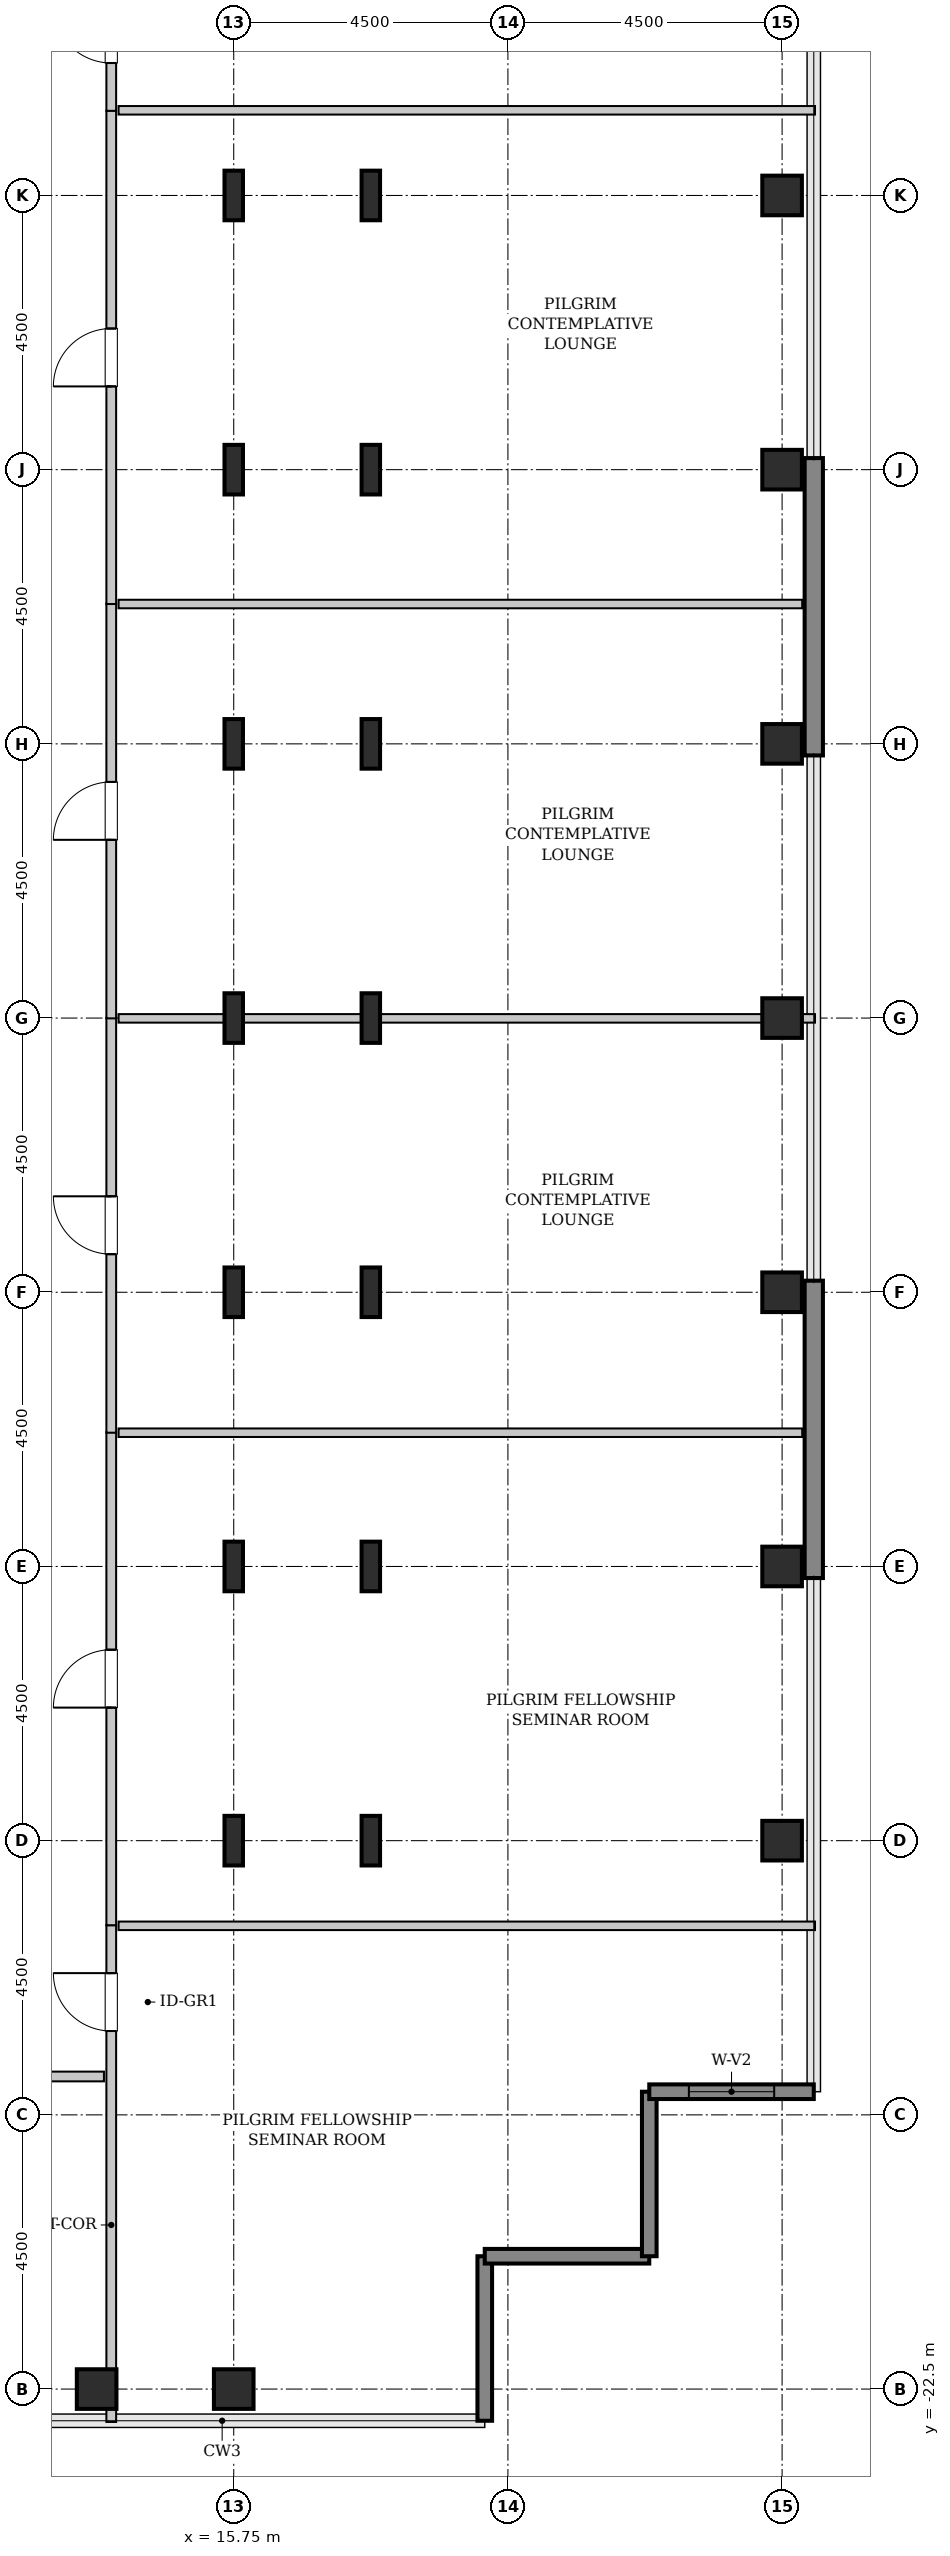
"""IFC4 building model, lengths in metres.
Left out: names, types, materials, properties, quantities, classifications, styles, units other than length and angle.
Written with IfcOpenShell. Run it as: python <this file> out.ifc"""

import sys

from ifc_helpers import new_model, si_unit, direction, frame, frame_2d, origin, origin_2d, place, context, subcontext, project, spatial, rectangle, hollow_rectangle, i_section, extrude, source, transform, mapped, element, fill, save


model = new_model("IFC4")
c1 = context("Model", 3, precision=1e-05, world=origin(), true_north=direction((0.0, 1.0)))
c2 = subcontext(c1, "Body", "Model", "MODEL_VIEW")
j1 = project(units=[si_unit("LENGTHUNIT", "METRE"), si_unit("PLANEANGLEUNIT", "RADIAN")], contexts=[c1])
p1 = place(None, origin())
s1 = spatial("IfcSite", under=j1, at=p1, CompositionType="ELEMENT")
p2 = place(p1, origin())
s2 = spatial("IfcBuilding", under=s1, at=p2, CompositionType="ELEMENT")
p3 = place(p2, frame((0.0, 0.0, 206.6)))
s3 = spatial("IfcBuildingStorey", under=s2, at=p3, CompositionType="ELEMENT", Elevation=206.6)
m1 = source(origin(), c2, "Body", "SweptSolid", [
    extrude(hollow_rectangle(XDim=0.65, YDim=0.65, WallThickness=0.032, InnerFilletRadius=0.032, OuterFilletRadius=0.064, at=origin_2d()), origin(), (0.0, 0.0, 1.0), 3.8),
])
for number, where, z_axis, x_axis in (
    (1, (13.5, -22.5, 0.0), (0.0, 0.0, 1.0), (1.0, 0.0, 0.0)),
    (2, (15.75, -22.5, 0.0), (0.0, 0.0, 1.0), (1.0, 0.0, 0.0)),
):
    element("IfcColumn", number, at=place(p3, frame(where, z_axis=z_axis, x_axis=x_axis)), inside=s3, PredefinedType="COLUMN", context=c2, shape_type="MappedRepresentation", body=[
        mapped(m1, transform((0.0, 0.0, 0.0), x_axis=(1.0, 0.0, 0.0), y_axis=(0.0, 1.0, 0.0), z_axis=(0.0, 0.0, 1.0), scale=1.0)),
    ])
m2 = source(origin(), c2, "Body", "SweptSolid", [
    extrude(i_section(OverallWidth=0.303, OverallDepth=0.814, WebThickness=0.021, FlangeThickness=0.04, FilletRadius=0.03, at=origin_2d()), origin(), (0.0, 0.0, 1.0), 3.8),
])
for number, where, z_axis, x_axis in (
    (3, (15.75, -13.5, 0.0), (0.0, 0.0, 1.0), (1.0, 0.0, 0.0)),
    (4, (15.75, -9.0, 0.0), (0.0, 0.0, 1.0), (1.0, 0.0, 0.0)),
    (5, (15.75, -4.5, 0.0), (0.0, 0.0, 1.0), (1.0, 0.0, 0.0)),
    (6, (15.75, 0.0, 0.0), (0.0, 0.0, 1.0), (1.0, 0.0, 0.0)),
    (7, (15.75, 4.5, 0.0), (0.0, 0.0, 1.0), (1.0, 0.0, 0.0)),
    (8, (15.75, 9.0, 0.0), (0.0, 0.0, 1.0), (1.0, 0.0, 0.0)),
    (9, (15.75, 13.5, 0.0), (0.0, 0.0, 1.0), (1.0, 0.0, 0.0)),
    (10, (18.0, -13.5, 0.0), (0.0, 0.0, 1.0), (1.0, 0.0, 0.0)),
    (11, (18.0, -9.0, 0.0), (0.0, 0.0, 1.0), (1.0, 0.0, 0.0)),
    (12, (18.0, -4.5, 0.0), (0.0, 0.0, 1.0), (1.0, 0.0, 0.0)),
    (13, (18.0, 0.0, 0.0), (0.0, 0.0, 1.0), (1.0, 0.0, 0.0)),
    (14, (18.0, 4.5, 0.0), (0.0, 0.0, 1.0), (1.0, 0.0, 0.0)),
    (15, (18.0, 9.0, 0.0), (0.0, 0.0, 1.0), (1.0, 0.0, 0.0)),
    (16, (18.0, 13.5, 0.0), (0.0, 0.0, 1.0), (1.0, 0.0, 0.0)),
):
    element("IfcColumn", number, at=place(p3, frame(where, z_axis=z_axis, x_axis=x_axis)), inside=s3, PredefinedType="COLUMN", context=c2, shape_type="MappedRepresentation", body=[
        mapped(m2, transform((0.0, 0.0, 0.0), x_axis=(1.0, 0.0, 0.0), y_axis=(0.0, 1.0, 0.0), z_axis=(0.0, 0.0, 1.0), scale=1.0)),
    ])
for number, where, z_axis, x_axis in (
    (17, (24.75, -13.5, 0.0), (0.0, 0.0, 1.0), (1.0, 0.0, 0.0)),
    (18, (24.75, -9.0, 0.0), (0.0, 0.0, 1.0), (1.0, 0.0, 0.0)),
    (19, (24.75, -4.5, 0.0), (0.0, 0.0, 1.0), (1.0, 0.0, 0.0)),
    (20, (24.75, 0.0, 0.0), (0.0, 0.0, 1.0), (1.0, 0.0, 0.0)),
    (21, (24.75, 4.5, 0.0), (0.0, 0.0, 1.0), (1.0, 0.0, 0.0)),
    (22, (24.75, 9.0, 0.0), (0.0, 0.0, 1.0), (1.0, 0.0, 0.0)),
    (23, (24.75, 13.5, 0.0), (0.0, 0.0, 1.0), (1.0, 0.0, 0.0)),
):
    element("IfcColumn", number, at=place(p3, frame(where, z_axis=z_axis, x_axis=x_axis)), inside=s3, PredefinedType="COLUMN", context=c2, shape_type="MappedRepresentation", body=[
        mapped(m1, transform((0.0, 0.0, 0.0), x_axis=(1.0, 0.0, 0.0), y_axis=(0.0, 1.0, 0.0), z_axis=(0.0, 0.0, 1.0), scale=1.0)),
    ])
m3 = source(origin(), c2, "Body", "SweptSolid", [
    extrude(rectangle(XDim=4.88, YDim=0.3, at=frame_2d((2.44, 0.0))), origin(), (0.0, 0.0, 1.0), 3.55),
])
for number, where, z_axis, x_axis in (
    (24, (25.27, -9.19, 0.0), (0.0, 0.0, 1.0), (0.0, 1.0, 0.0)),
    (25, (25.27, 4.31, 0.0), (0.0, 0.0, 1.0), (0.0, 1.0, 0.0)),
):
    element("IfcWall", number, at=place(p3, frame(where, z_axis=z_axis, x_axis=x_axis)), inside=s3, PredefinedType="SHEAR", context=c2, shape_type="MappedRepresentation", body=[
        mapped(m3, transform((0.0, 0.0, 0.0), x_axis=(1.0, 0.0, 0.0), y_axis=(0.0, 1.0, 0.0), z_axis=(0.0, 0.0, 1.0), scale=1.0)),
    ])
m4 = source(origin(), c2, "Body", "SweptSolid", [
    extrude(rectangle(XDim=2.7, YDim=0.24, at=frame_2d((1.35, 0.0))), origin(), (0.0, 0.0, 1.0), 3.55),
])
for number, where, z_axis, x_axis in (
    (26, (19.87, -23.02, 0.0), (0.0, 0.0, 1.0), (0.0, 1.0, 0.0)),
    (27, (19.87, -20.32, 0.0), (0.0, 0.0, 1.0), (1.0, 0.0, 0.0)),
    (28, (22.57, -20.32, 0.0), (0.0, 0.0, 1.0), (0.0, 1.0, 0.0)),
):
    element("IfcWall", number, at=place(p3, frame(where, z_axis=z_axis, x_axis=x_axis)), inside=s3, PredefinedType="SHEAR", context=c2, shape_type="MappedRepresentation", body=[
        mapped(m4, transform((0.0, 0.0, 0.0), x_axis=(1.0, 0.0, 0.0), y_axis=(0.0, 1.0, 0.0), z_axis=(0.0, 0.0, 1.0), scale=1.0)),
    ])
p4 = place(p3, frame((22.57, -17.62, 0.0), z_axis=(0.0, 0.0, 1.0), x_axis=(1.0, 0.0, 0.0)))
e29 = element("IfcWall", 29, at=p4, inside=s3, PredefinedType="SHEAR", context=c2, shape_type="MappedRepresentation", body=[
    mapped(m4, transform((0.0, 0.0, 0.0), x_axis=(1.0, 0.0, 0.0), y_axis=(0.0, 1.0, 0.0), z_axis=(0.0, 0.0, 1.0), scale=1.0)),
])
p5 = place(p4, frame((0.65, 0.0, 0.85)))
e30 = element("IfcOpeningElement", 30, at=p5, cuts=e29, PredefinedType="OPENING", context=c2, shape_type="SweptSolid", body=[
    extrude(rectangle(XDim=1.4, YDim=1.8, at=frame_2d((0.7, 0.9))), frame((0.0, 0.13, 0.0), z_axis=(0.0, -1.0, 0.0), x_axis=(1.0, 0.0, 0.0)), (0.0, 0.0, 1.0), 0.26),
])
m5 = source(origin(), c2, "Body", "SweptSolid", [
    extrude(rectangle(XDim=8.153, YDim=0.16, at=frame_2d((4.076, 0.0))), origin(), (0.0, 0.0, 1.0), 3.535),
])
p6 = place(p3, frame((13.74, -23.04, 0.0), z_axis=(0.0, 0.0, 1.0), x_axis=(0.0, 1.0, 0.0)))
e31 = element("IfcWall", 31, at=p6, inside=s3, PredefinedType="PARTITIONING", context=c2, shape_type="MappedRepresentation", body=[
    mapped(m5, transform((0.0, 0.0, 0.0), x_axis=(1.0, 0.0, 0.0), y_axis=(0.0, 1.0, 0.0), z_axis=(0.0, 0.0, 1.0), scale=1.0)),
])
p7 = place(p6, frame((6.416, 0.0, 0.0)))
e32 = element("IfcOpeningElement", 32, at=p7, cuts=e31, PredefinedType="OPENING", context=c2, shape_type="SweptSolid", body=[
    extrude(rectangle(XDim=0.95, YDim=2.1, at=frame_2d((0.475, 1.05))), frame((0.0, 0.09, 0.0), z_axis=(0.0, -1.0, 0.0), x_axis=(1.0, 0.0, 0.0)), (0.0, 0.0, 1.0), 0.18),
])
m6 = source(origin(), c2, "Body", "SweptSolid", [
    extrude(rectangle(XDim=11.43, YDim=0.14, at=frame_2d((5.715, 0.0))), origin(), (0.0, 0.0, 1.0), 3.535),
])
p8 = place(p3, frame((13.86, -14.897, 0.0), z_axis=(0.0, 0.0, 1.0), x_axis=(1.0, 0.0, 0.0)))
e33 = element("IfcWall", 33, at=p8, inside=s3, PredefinedType="PARTITIONING", context=c2, shape_type="MappedRepresentation", body=[
    mapped(m6, transform((0.0, 0.0, 0.0), x_axis=(1.0, 0.0, 0.0), y_axis=(0.0, 1.0, 0.0), z_axis=(0.0, 0.0, 1.0), scale=1.0)),
])
m7 = source(origin(), c2, "Body", "SweptSolid", [
    extrude(rectangle(XDim=8.093, YDim=0.16, at=frame_2d((4.046, 0.0))), origin(), (0.0, 0.0, 1.0), 3.535),
])
p9 = place(p3, frame((13.74, -14.887, 0.0), z_axis=(0.0, 0.0, 1.0), x_axis=(0.0, 1.0, 0.0)))
e34 = element("IfcWall", 34, at=p9, inside=s3, PredefinedType="PARTITIONING", context=c2, shape_type="MappedRepresentation", body=[
    mapped(m7, transform((0.0, 0.0, 0.0), x_axis=(1.0, 0.0, 0.0), y_axis=(0.0, 1.0, 0.0), z_axis=(0.0, 0.0, 1.0), scale=1.0)),
])
p10 = place(p9, frame((3.571, 0.0, 0.0)))
e35 = element("IfcOpeningElement", 35, at=p10, cuts=e34, PredefinedType="OPENING", context=c2, shape_type="SweptSolid", body=[
    extrude(rectangle(XDim=0.95, YDim=2.1, at=frame_2d((0.475, 1.05))), frame((0.0, 0.09, 0.0), z_axis=(0.0, -1.0, 0.0), x_axis=(1.0, 0.0, 0.0)), (0.0, 0.0, 1.0), 0.18),
])
m8 = source(origin(), c2, "Body", "SweptSolid", [
    extrude(rectangle(XDim=11.22, YDim=0.14, at=frame_2d((5.61, 0.0))), origin(), (0.0, 0.0, 1.0), 3.535),
])
p11 = place(p3, frame((13.86, -6.805, 0.0), z_axis=(0.0, 0.0, 1.0), x_axis=(1.0, 0.0, 0.0)))
e36 = element("IfcWall", 36, at=p11, inside=s3, PredefinedType="PARTITIONING", context=c2, shape_type="MappedRepresentation", body=[
    mapped(m8, transform((0.0, 0.0, 0.0), x_axis=(1.0, 0.0, 0.0), y_axis=(0.0, 1.0, 0.0), z_axis=(0.0, 0.0, 1.0), scale=1.0)),
])
m9 = source(origin(), c2, "Body", "SweptSolid", [
    extrude(rectangle(XDim=6.81, YDim=0.16, at=frame_2d((3.405, 0.0))), origin(), (0.0, 0.0, 1.0), 3.535),
])
p12 = place(p3, frame((13.74, -6.805, 0.0), z_axis=(0.0, 0.0, 1.0), x_axis=(0.0, 1.0, 0.0)))
e37 = element("IfcWall", 37, at=p12, inside=s3, PredefinedType="PARTITIONING", context=c2, shape_type="MappedRepresentation", body=[
    mapped(m9, transform((0.0, 0.0, 0.0), x_axis=(1.0, 0.0, 0.0), y_axis=(0.0, 1.0, 0.0), z_axis=(0.0, 0.0, 1.0), scale=1.0)),
])
p13 = place(p12, frame((2.93, 0.0, 0.0)))
e38 = element("IfcOpeningElement", 38, at=p13, cuts=e37, PredefinedType="OPENING", context=c2, shape_type="SweptSolid", body=[
    extrude(rectangle(XDim=0.95, YDim=2.1, at=frame_2d((0.475, 1.05))), frame((0.0, 0.09, 0.0), z_axis=(0.0, -1.0, 0.0), x_axis=(1.0, 0.0, 0.0)), (0.0, 0.0, 1.0), 0.18),
])
m10 = source(origin(), c2, "Body", "SweptSolid", [
    extrude(rectangle(XDim=11.43, YDim=0.14, at=frame_2d((5.715, 0.0))), origin(), (0.0, 0.0, 1.0), 2.925),
])
p14 = place(p3, frame((13.86, -0.005, 0.0), z_axis=(0.0, 0.0, 1.0), x_axis=(1.0, 0.0, 0.0)))
e39 = element("IfcWall", 39, at=p14, inside=s3, PredefinedType="PARTITIONING", context=c2, shape_type="MappedRepresentation", body=[
    mapped(m10, transform((0.0, 0.0, 0.0), x_axis=(1.0, 0.0, 0.0), y_axis=(0.0, 1.0, 0.0), z_axis=(0.0, 0.0, 1.0), scale=1.0)),
])
p15 = place(p3, frame((13.74, -0.005, 0.0), z_axis=(0.0, 0.0, 1.0), x_axis=(0.0, 1.0, 0.0)))
e40 = element("IfcWall", 40, at=p15, inside=s3, PredefinedType="PARTITIONING", context=c2, shape_type="MappedRepresentation", body=[
    mapped(m9, transform((0.0, 0.0, 0.0), x_axis=(1.0, 0.0, 0.0), y_axis=(0.0, 1.0, 0.0), z_axis=(0.0, 0.0, 1.0), scale=1.0)),
])
p16 = place(p15, frame((2.93, 0.0, 0.0)))
e41 = element("IfcOpeningElement", 41, at=p16, cuts=e40, PredefinedType="OPENING", context=c2, shape_type="SweptSolid", body=[
    extrude(rectangle(XDim=0.95, YDim=2.1, at=frame_2d((0.475, 1.05))), frame((0.0, 0.09, 0.0), z_axis=(0.0, -1.0, 0.0), x_axis=(1.0, 0.0, 0.0)), (0.0, 0.0, 1.0), 0.18),
])
p17 = place(p3, frame((13.86, 6.795, 0.0), z_axis=(0.0, 0.0, 1.0), x_axis=(1.0, 0.0, 0.0)))
e42 = element("IfcWall", 42, at=p17, inside=s3, PredefinedType="PARTITIONING", context=c2, shape_type="MappedRepresentation", body=[
    mapped(m8, transform((0.0, 0.0, 0.0), x_axis=(1.0, 0.0, 0.0), y_axis=(0.0, 1.0, 0.0), z_axis=(0.0, 0.0, 1.0), scale=1.0)),
])
p18 = place(p3, frame((13.74, 14.887, 0.0), z_axis=(0.0, 0.0, 1.0), x_axis=(0.0, 1.0, 0.0)))
e43 = element("IfcWall", 43, at=p18, inside=s3, PredefinedType="PARTITIONING", context=c2, shape_type="MappedRepresentation", body=[
    mapped(m5, transform((0.0, 0.0, 0.0), x_axis=(1.0, 0.0, 0.0), y_axis=(0.0, 1.0, 0.0), z_axis=(0.0, 0.0, 1.0), scale=1.0)),
])
p19 = place(p18, frame((0.786, 0.0, 0.0)))
e44 = element("IfcOpeningElement", 44, at=p19, cuts=e43, PredefinedType="OPENING", context=c2, shape_type="SweptSolid", body=[
    extrude(rectangle(XDim=0.95, YDim=2.1, at=frame_2d((0.475, 1.05))), frame((0.0, 0.09, 0.0), z_axis=(0.0, -1.0, 0.0), x_axis=(1.0, 0.0, 0.0)), (0.0, 0.0, 1.0), 0.18),
])
p20 = place(p3, frame((13.86, 14.897, 0.0), z_axis=(0.0, 0.0, 1.0), x_axis=(1.0, 0.0, 0.0)))
e45 = element("IfcWall", 45, at=p20, inside=s3, PredefinedType="PARTITIONING", context=c2, shape_type="MappedRepresentation", body=[
    mapped(m6, transform((0.0, 0.0, 0.0), x_axis=(1.0, 0.0, 0.0), y_axis=(0.0, 1.0, 0.0), z_axis=(0.0, 0.0, 1.0), scale=1.0)),
])
p21 = place(p3, frame((13.74, 6.795, 0.0), z_axis=(0.0, 0.0, 1.0), x_axis=(0.0, 1.0, 0.0)))
e46 = element("IfcWall", 46, at=p21, inside=s3, PredefinedType="PARTITIONING", context=c2, shape_type="MappedRepresentation", body=[
    mapped(m7, transform((0.0, 0.0, 0.0), x_axis=(1.0, 0.0, 0.0), y_axis=(0.0, 1.0, 0.0), z_axis=(0.0, 0.0, 1.0), scale=1.0)),
])
p22 = place(p21, frame((3.571, 0.0, 0.0)))
e47 = element("IfcOpeningElement", 47, at=p22, cuts=e46, PredefinedType="OPENING", context=c2, shape_type="SweptSolid", body=[
    extrude(rectangle(XDim=0.95, YDim=2.1, at=frame_2d((0.475, 1.05))), frame((0.0, 0.09, 0.0), z_axis=(0.0, -1.0, 0.0), x_axis=(1.0, 0.0, 0.0)), (0.0, 0.0, 1.0), 0.18),
])
m11 = source(origin(), c2, "Body", "SweptSolid", [
    extrude(rectangle(XDim=6.225, YDim=0.16, at=frame_2d((3.113, 0.0))), origin(), (0.0, 0.0, 1.0), 3.535),
])
p23 = place(p3, frame((7.395, -17.37, 0.0), z_axis=(0.0, 0.0, 1.0), x_axis=(1.0, 0.0, 0.0)))
e48 = element("IfcWall", 48, at=p23, inside=s3, PredefinedType="PARTITIONING", context=c2, shape_type="MappedRepresentation", body=[
    mapped(m11, transform((0.0, 0.0, 0.0), x_axis=(1.0, 0.0, 0.0), y_axis=(0.0, 1.0, 0.0), z_axis=(0.0, 0.0, 1.0), scale=1.0)),
])
p24 = place(p23, frame((2.26, 0.0, 0.0)))
e49 = element("IfcOpeningElement", 49, at=p24, cuts=e48, PredefinedType="OPENING", context=c2, shape_type="SweptSolid", body=[
    extrude(rectangle(XDim=0.95, YDim=2.1, at=frame_2d((0.475, 1.05))), frame((0.0, 0.09, 0.0), z_axis=(0.0, -1.0, 0.0), x_axis=(1.0, 0.0, 0.0)), (0.0, 0.0, 1.0), 0.18),
])
m12 = source(origin(), c2, "Body", "SweptSolid", [
    extrude(rectangle(XDim=1.4, YDim=1.8, at=frame_2d((0.7, 0.9))), frame((0.0, 0.03, 0.0), z_axis=(0.0, -1.0, 0.0), x_axis=(1.0, 0.0, 0.0)), (0.0, 0.0, 1.0), 0.06),
])
p25 = place(p5, origin())
e50 = element("IfcWindow", 50, at=p25, inside=s3, PartitioningType="SINGLE_PANEL", PredefinedType="WINDOW", context=c2, shape_type="MappedRepresentation", body=[
    mapped(m12, transform((0.0, 0.0, 0.0), x_axis=(1.0, 0.0, 0.0), y_axis=(0.0, 1.0, 0.0), z_axis=(0.0, 0.0, 1.0), scale=1.0)),
])
fill(e30, e50)
m13 = source(origin(), c2, "Body", "SweptSolid", [
    extrude(rectangle(XDim=0.95, YDim=2.1, at=frame_2d((0.475, 1.05))), frame((0.0, 0.025, 0.0), z_axis=(0.0, -1.0, 0.0), x_axis=(1.0, 0.0, 0.0)), (0.0, 0.0, 1.0), 0.05),
])
p26 = place(p7, origin())
e51 = element("IfcDoor", 51, at=p26, inside=s3, OperationType="SINGLE_SWING_RIGHT", PredefinedType="DOOR", context=c2, shape_type="MappedRepresentation", body=[
    mapped(m13, transform((0.0, 0.0, 0.0), x_axis=(1.0, 0.0, 0.0), y_axis=(0.0, 1.0, 0.0), z_axis=(0.0, 0.0, 1.0), scale=1.0)),
])
fill(e32, e51)
p27 = place(p10, origin())
e52 = element("IfcDoor", 52, at=p27, inside=s3, OperationType="SINGLE_SWING_LEFT", PredefinedType="DOOR", context=c2, shape_type="MappedRepresentation", body=[
    mapped(m13, transform((0.0, 0.0, 0.0), x_axis=(1.0, 0.0, 0.0), y_axis=(0.0, 1.0, 0.0), z_axis=(0.0, 0.0, 1.0), scale=1.0)),
])
fill(e35, e52)
p28 = place(p13, origin())
e53 = element("IfcDoor", 53, at=p28, inside=s3, OperationType="SINGLE_SWING_RIGHT", PredefinedType="DOOR", context=c2, shape_type="MappedRepresentation", body=[
    mapped(m13, transform((0.0, 0.0, 0.0), x_axis=(1.0, 0.0, 0.0), y_axis=(0.0, 1.0, 0.0), z_axis=(0.0, 0.0, 1.0), scale=1.0)),
])
fill(e38, e53)
p29 = place(p16, origin())
e54 = element("IfcDoor", 54, at=p29, inside=s3, OperationType="SINGLE_SWING_LEFT", PredefinedType="DOOR", context=c2, shape_type="MappedRepresentation", body=[
    mapped(m13, transform((0.0, 0.0, 0.0), x_axis=(1.0, 0.0, 0.0), y_axis=(0.0, 1.0, 0.0), z_axis=(0.0, 0.0, 1.0), scale=1.0)),
])
fill(e41, e54)
p30 = place(p19, origin())
e55 = element("IfcDoor", 55, at=p30, inside=s3, OperationType="SINGLE_SWING_RIGHT", PredefinedType="DOOR", context=c2, shape_type="MappedRepresentation", body=[
    mapped(m13, transform((0.0, 0.0, 0.0), x_axis=(1.0, 0.0, 0.0), y_axis=(0.0, 1.0, 0.0), z_axis=(0.0, 0.0, 1.0), scale=1.0)),
])
fill(e44, e55)
p31 = place(p22, origin())
e56 = element("IfcDoor", 56, at=p31, inside=s3, OperationType="SINGLE_SWING_LEFT", PredefinedType="DOOR", context=c2, shape_type="MappedRepresentation", body=[
    mapped(m13, transform((0.0, 0.0, 0.0), x_axis=(1.0, 0.0, 0.0), y_axis=(0.0, 1.0, 0.0), z_axis=(0.0, 0.0, 1.0), scale=1.0)),
])
fill(e47, e56)
save(model, sys.argv[1])
